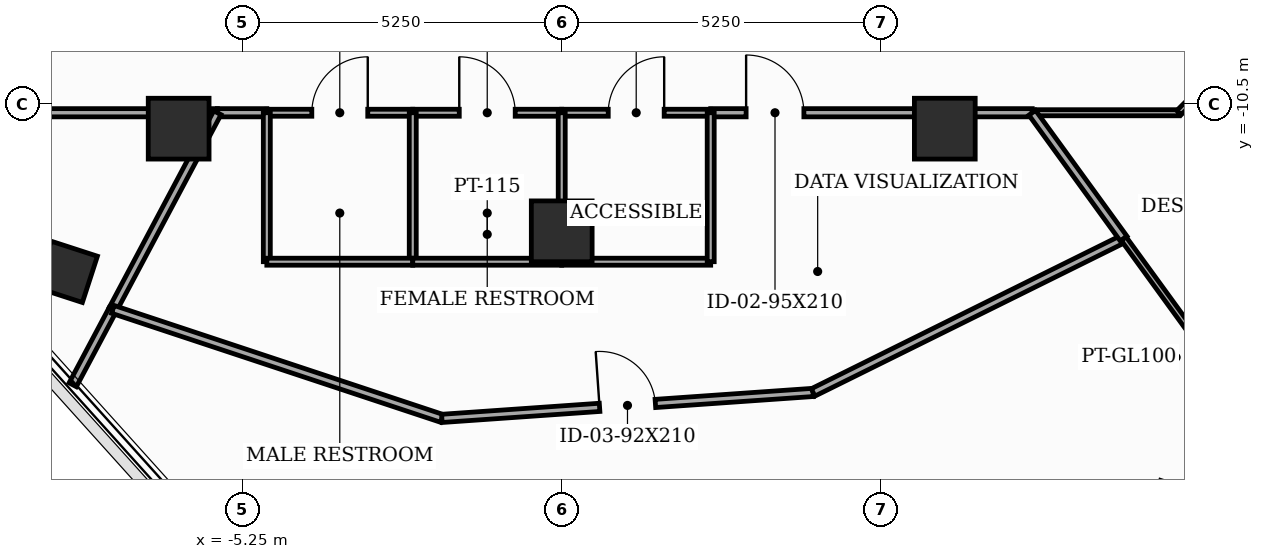
"""IFC4 building model, lengths in metres.
Left out: names, types, materials, properties, quantities, classifications, styles, units other than length and angle.
Written with IfcOpenShell. Run it as: python <this file> out.ifc"""

import sys

from ifc_helpers import new_model, si_unit, direction, frame, frame_2d, origin, origin_2d, place, context, subcontext, project, spatial, rectangle, extrude, element, fill, save


model = new_model("IFC4")
c1 = context("Model", 3, precision=1e-05, world=origin(), true_north=direction((0.0, 1.0)))
c2 = subcontext(c1, "Body", "Model", "MODEL_VIEW")
j1 = project(units=[si_unit("LENGTHUNIT", "METRE"), si_unit("PLANEANGLEUNIT", "RADIAN")], contexts=[c1])
p1 = place(None, origin())
s1 = spatial("IfcSite", under=j1, at=p1, CompositionType="ELEMENT")
p2 = place(p1, origin())
s2 = spatial("IfcBuilding", under=s1, at=p2, CompositionType="ELEMENT")
p3 = place(p2, frame((0.0, 0.0, 294.3)))
s3 = spatial("IfcBuildingStorey", under=s2, at=p3, CompositionType="ELEMENT", Elevation=294.3)
for number, where, z_axis, x_axis in (
    (1, (-6.3, -10.912, 0.0), (0.0, 0.0, 1.0), (1.0, 0.0, 0.0)),
    (2, (0.0, -12.6, 0.0), (0.0, 0.0, 1.0), (1.0, 0.0, 0.0)),
    (3, (6.3, -10.912, 0.0), (0.0, 0.0, 1.0), (1.0, 0.0, 0.0)),
):
    element("IfcColumn", number, at=place(p3, frame(where, z_axis=z_axis, x_axis=x_axis)), inside=s3, PredefinedType="COLUMN", context=c2, shape_type="SweptSolid", body=[
        extrude(rectangle(XDim=1.0, YDim=1.0, at=origin_2d()), origin(), (0.0, 0.0, 1.0), 3.7),
    ])
p4 = place(p3, frame((-8.14, -13.266, 0.0), z_axis=(0.0, 0.0, 1.0), x_axis=(0.309016994375, 0.951056516295, 0.0)))
e4 = element("IfcColumn", 4, at=p4, inside=s3, PredefinedType="COLUMN", context=c2, shape_type="SweptSolid", body=[
    extrude(rectangle(XDim=0.8, YDim=0.8, at=origin_2d()), origin(), (0.0, 0.0, 1.0), 3.7),
])
p5 = place(p3, frame((-10.15, -10.65, 0.0), z_axis=(0.0, 0.0, 1.0), x_axis=(1.0, 0.0, 0.0)))
e5 = element("IfcWall", 5, at=p5, inside=s3, PredefinedType="PARTITIONING", context=c2, shape_type="SweptSolid", body=[
    extrude(rectangle(XDim=4.487, YDim=0.135, at=frame_2d((2.243, 0.0))), origin(), (0.0, 0.0, 1.0), 2.885),
])
p6 = place(p3, frame((-4.85, -10.65, 0.0), z_axis=(0.0, 0.0, 1.0), x_axis=(1.0, 0.0, 0.0)))
e6 = element("IfcWall", 6, at=p6, inside=s3, PredefinedType="PARTITIONING", context=c2, shape_type="SweptSolid", body=[
    extrude(rectangle(XDim=2.4, YDim=0.115, at=frame_2d((1.2, 0.0))), origin(), (0.0, 0.0, 1.0), 3.5),
])
p7 = place(p6, frame((0.74, 0.0, 0.0)))
e7 = element("IfcOpeningElement", 7, at=p7, cuts=e6, PredefinedType="OPENING", context=c2, shape_type="SweptSolid", body=[
    extrude(rectangle(XDim=0.92, YDim=2.1, at=frame_2d((0.46, 1.05))), frame((0.0, 0.067, 0.0), z_axis=(0.0, -1.0, 0.0), x_axis=(1.0, 0.0, 0.0)), (0.0, 0.0, 1.0), 0.135),
])
p8 = place(p3, frame((-2.45, -10.65, 0.0), z_axis=(0.0, 0.0, 1.0), x_axis=(1.0, 0.0, 0.0)))
e8 = element("IfcWall", 8, at=p8, inside=s3, PredefinedType="PARTITIONING", context=c2, shape_type="SweptSolid", body=[
    extrude(rectangle(XDim=2.45, YDim=0.115, at=frame_2d((1.225, 0.0))), origin(), (0.0, 0.0, 1.0), 2.885),
])
p9 = place(p8, frame((0.765, 0.0, 0.0)))
e9 = element("IfcOpeningElement", 9, at=p9, cuts=e8, PredefinedType="OPENING", context=c2, shape_type="SweptSolid", body=[
    extrude(rectangle(XDim=0.92, YDim=2.1, at=frame_2d((0.46, 1.05))), frame((0.0, 0.067, 0.0), z_axis=(0.0, -1.0, 0.0), x_axis=(1.0, 0.0, 0.0)), (0.0, 0.0, 1.0), 0.135),
])
p10 = place(p3, frame((0.0, -10.65, 0.0), z_axis=(0.0, 0.0, 1.0), x_axis=(1.0, 0.0, 0.0)))
e10 = element("IfcWall", 10, at=p10, inside=s3, PredefinedType="PARTITIONING", context=c2, shape_type="SweptSolid", body=[
    extrude(rectangle(XDim=2.45, YDim=0.115, at=frame_2d((1.225, 0.0))), origin(), (0.0, 0.0, 1.0), 3.5),
])
p11 = place(p10, frame((0.765, 0.0, 0.0)))
e11 = element("IfcOpeningElement", 11, at=p11, cuts=e10, PredefinedType="OPENING", context=c2, shape_type="SweptSolid", body=[
    extrude(rectangle(XDim=0.92, YDim=2.1, at=frame_2d((0.46, 1.05))), frame((0.0, 0.067, 0.0), z_axis=(0.0, -1.0, 0.0), x_axis=(1.0, 0.0, 0.0)), (0.0, 0.0, 1.0), 0.135),
])
p12 = place(p3, frame((-5.663, -10.65, 0.0), z_axis=(0.0, 0.0, 1.0), x_axis=(1.0, 0.0, 0.0)))
e12 = element("IfcWall", 12, at=p12, inside=s3, PredefinedType="PARTITIONING", context=c2, shape_type="SweptSolid", body=[
    extrude(rectangle(XDim=0.813, YDim=0.135, at=frame_2d((0.406, 0.0))), origin(), (0.0, 0.0, 1.0), 3.5),
])
p13 = place(p3, frame((2.45, -10.65, 0.0), z_axis=(0.0, 0.0, 1.0), x_axis=(1.0, 0.0, 0.0)))
e13 = element("IfcWall", 13, at=p13, inside=s3, PredefinedType="PARTITIONING", context=c2, shape_type="SweptSolid", body=[
    extrude(rectangle(XDim=5.288, YDim=0.135, at=frame_2d((2.644, 0.0))), origin(), (0.0, 0.0, 1.0), 2.885),
])
p14 = place(p13, frame((0.583, 0.0, 0.0)))
e14 = element("IfcOpeningElement", 14, at=p14, cuts=e13, PredefinedType="OPENING", context=c2, shape_type="SweptSolid", body=[
    extrude(rectangle(XDim=0.95, YDim=2.1, at=frame_2d((0.475, 1.05))), frame((0.0, 0.077, 0.0), z_axis=(0.0, -1.0, 0.0), x_axis=(1.0, 0.0, 0.0)), (0.0, 0.0, 1.0), 0.155),
])
p15 = place(p3, frame((7.738, -10.65, 0.0), z_axis=(0.0, 0.0, 1.0), x_axis=(1.0, 0.0, 0.0)))
e15 = element("IfcWall", 15, at=p15, inside=s3, PredefinedType="MOVABLE", context=c2, shape_type="SweptSolid", body=[
    extrude(rectangle(XDim=2.412, YDim=0.1, at=frame_2d((1.206, 0.0))), origin(), (0.0, 0.0, 1.0), 3.5),
])
p16 = place(p3, frame((10.15, -10.65, 0.0), z_axis=(0.0, 0.0, 1.0), x_axis=(0.707106781187, 0.707106781187, 0.0)))
e16 = element("IfcWall", 16, at=p16, inside=s3, PredefinedType="MOVABLE", context=c2, shape_type="SweptSolid", body=[
    extrude(rectangle(XDim=0.707, YDim=0.1, at=frame_2d((0.354, 0.0))), origin(), (0.0, 0.0, 1.0), 3.5),
])
p17 = place(p3, frame((-7.382, -13.884, 0.0), z_axis=(0.0, 0.0, 1.0), x_axis=(0.469338791783, 0.88301817565, 0.0)))
e17 = element("IfcWall", 17, at=p17, inside=s3, PredefinedType="PARTITIONING", context=c2, shape_type="SweptSolid", body=[
    extrude(rectangle(XDim=3.663, YDim=0.135, at=frame_2d((1.831, 0.0))), origin(), (0.0, 0.0, 1.0), 2.885),
])
p18 = place(p3, frame((-8.042, -15.124, 0.0), z_axis=(0.0, 0.0, 1.0), x_axis=(0.469595679185, 0.882881587808, 0.0)))
e18 = element("IfcWall", 18, at=p18, inside=s3, PredefinedType="PARTITIONING", context=c2, shape_type="SweptSolid", body=[
    extrude(rectangle(XDim=1.405, YDim=0.135, at=frame_2d((0.702, 0.0))), origin(), (0.0, 0.0, 1.0), 3.035),
])
for number, where, z_axis, x_axis in (
    (19, (-2.45, -13.1, 0.0), (0.0, 0.0, 1.0), (0.0, 1.0, 0.0)),
    (20, (-4.85, -10.65, 0.0), (0.0, 0.0, 1.0), (0.0, -1.0, 0.0)),
):
    element("IfcWall", number, at=place(p3, frame(where, z_axis=z_axis, x_axis=x_axis)), inside=s3, PredefinedType="PARTITIONING", context=c2, shape_type="SweptSolid", body=[
        extrude(rectangle(XDim=2.45, YDim=0.115, at=frame_2d((1.225, 0.0))), origin(), (0.0, 0.0, 1.0), 2.885),
    ])
p19 = place(p3, frame((-4.85, -13.1, 0.0), z_axis=(0.0, 0.0, 1.0), x_axis=(1.0, 0.0, 0.0)))
e21 = element("IfcWall", 21, at=p19, inside=s3, PredefinedType="PARTITIONING", context=c2, shape_type="SweptSolid", body=[
    extrude(rectangle(XDim=2.4, YDim=0.115, at=frame_2d((1.2, 0.0))), origin(), (0.0, 0.0, 1.0), 3.5),
])
p20 = place(p3, frame((0.0, -13.1, 0.0), z_axis=(0.0, 0.0, 1.0), x_axis=(0.0, 1.0, 0.0)))
e22 = element("IfcWall", 22, at=p20, inside=s3, PredefinedType="PARTITIONING", context=c2, shape_type="SweptSolid", body=[
    extrude(rectangle(XDim=2.45, YDim=0.115, at=frame_2d((1.225, 0.0))), origin(), (0.0, 0.0, 1.0), 2.885),
])
for number, where, z_axis, x_axis in (
    (23, (-2.45, -13.1, 0.0), (0.0, 0.0, 1.0), (1.0, 0.0, 0.0)),
    (24, (0.0, -13.1, 0.0), (0.0, 0.0, 1.0), (1.0, 0.0, 0.0)),
):
    element("IfcWall", number, at=place(p3, frame(where, z_axis=z_axis, x_axis=x_axis)), inside=s3, PredefinedType="PARTITIONING", context=c2, shape_type="SweptSolid", body=[
        extrude(rectangle(XDim=2.45, YDim=0.115, at=frame_2d((1.225, 0.0))), origin(), (0.0, 0.0, 1.0), 3.035),
    ])
p21 = place(p3, frame((2.45, -13.1, 0.0), z_axis=(0.0, 0.0, 1.0), x_axis=(0.0, 1.0, 0.0)))
e25 = element("IfcWall", 25, at=p21, inside=s3, PredefinedType="PARTITIONING", context=c2, shape_type="SweptSolid", body=[
    extrude(rectangle(XDim=2.45, YDim=0.115, at=frame_2d((1.225, 0.0))), origin(), (0.0, 0.0, 1.0), 2.885),
])
p22 = place(p3, frame((-7.382, -13.884, 0.0), z_axis=(0.0, 0.0, 1.0), x_axis=(0.949247116003, -0.314531258795, 0.0)))
e26 = element("IfcWall", 26, at=p22, inside=s3, PredefinedType="PARTITIONING", context=c2, shape_type="SweptSolid", body=[
    extrude(rectangle(XDim=5.7, YDim=0.135, at=frame_2d((2.85, 0.0))), origin(), (0.0, 0.0, 1.0), 3.035),
])
p23 = place(p3, frame((-1.971, -15.677, 0.0), z_axis=(0.0, 0.0, 1.0), x_axis=(0.997562911572, 0.069772755832, 0.0)))
e27 = element("IfcWall", 27, at=p23, inside=s3, PredefinedType="PARTITIONING", context=c2, shape_type="SweptSolid", body=[
    extrude(rectangle(XDim=6.12, YDim=0.135, at=frame_2d((3.06, 0.0))), origin(), (0.0, 0.0, 1.0), 3.035),
])
p24 = place(p23, frame((2.6, 0.0, 0.0)))
e28 = element("IfcOpeningElement", 28, at=p24, cuts=e27, PredefinedType="OPENING", context=c2, shape_type="SweptSolid", body=[
    extrude(rectangle(XDim=0.92, YDim=2.1, at=frame_2d((0.46, 1.05))), frame((0.0, 0.077, 0.0), z_axis=(0.0, -1.0, 0.0), x_axis=(1.0, 0.0, 0.0)), (0.0, 0.0, 1.0), 0.155),
])
p25 = place(p3, frame((4.134, -15.25, 0.0), z_axis=(0.0, 0.0, 1.0), x_axis=(0.896167979159, 0.443714945804, 0.0)))
e29 = element("IfcWall", 29, at=p25, inside=s3, PredefinedType="PARTITIONING", context=c2, shape_type="SweptSolid", body=[
    extrude(rectangle(XDim=5.7, YDim=0.135, at=frame_2d((2.85, 0.0))), origin(), (0.0, 0.0, 1.0), 3.035),
])
p26 = place(p3, frame((9.242, -12.721, 0.0), z_axis=(0.0, 0.0, 1.0), x_axis=(-0.58758169089, 0.80916485127, 0.0)))
e30 = element("IfcWall", 30, at=p26, inside=s3, PredefinedType="PARTITIONING", context=c2, shape_type="SweptSolid", body=[
    extrude(rectangle(XDim=2.56, YDim=0.135, at=frame_2d((1.28, 0.0))), origin(), (0.0, 0.0, 1.0), 3.5),
])
p27 = place(p3, frame((11.695, -16.096, 0.0), z_axis=(0.0, 0.0, 1.0), x_axis=(-0.587938546927, 0.808905597111, 0.0)))
e31 = element("IfcWall", 31, at=p27, inside=s3, PredefinedType="MOVABLE", context=c2, shape_type="SweptSolid", body=[
    extrude(rectangle(XDim=4.172, YDim=0.1, at=frame_2d((2.086, 0.0))), origin(), (0.0, 0.0, 1.0), 3.035),
])
p28 = place(p7, origin())
e32 = element("IfcDoor", 32, at=p28, inside=s3, OperationType="SINGLE_SWING_RIGHT", PredefinedType="DOOR", context=c2, shape_type="SweptSolid", body=[
    extrude(rectangle(XDim=0.92, YDim=2.1, at=frame_2d((0.46, 1.05))), frame((0.0, 0.025, 0.0), z_axis=(0.0, -1.0, 0.0), x_axis=(1.0, 0.0, 0.0)), (0.0, 0.0, 1.0), 0.05),
])
fill(e7, e32)
p29 = place(p9, origin())
e33 = element("IfcDoor", 33, at=p29, inside=s3, OperationType="SINGLE_SWING_LEFT", PredefinedType="DOOR", context=c2, shape_type="SweptSolid", body=[
    extrude(rectangle(XDim=0.92, YDim=2.1, at=frame_2d((0.46, 1.05))), frame((0.0, 0.025, 0.0), z_axis=(0.0, -1.0, 0.0), x_axis=(1.0, 0.0, 0.0)), (0.0, 0.0, 1.0), 0.05),
])
fill(e9, e33)
p30 = place(p11, origin())
e34 = element("IfcDoor", 34, at=p30, inside=s3, OperationType="SINGLE_SWING_RIGHT", PredefinedType="DOOR", context=c2, shape_type="SweptSolid", body=[
    extrude(rectangle(XDim=0.92, YDim=2.1, at=frame_2d((0.46, 1.05))), frame((0.0, 0.025, 0.0), z_axis=(0.0, -1.0, 0.0), x_axis=(1.0, 0.0, 0.0)), (0.0, 0.0, 1.0), 0.05),
])
fill(e11, e34)
p31 = place(p14, origin())
e35 = element("IfcDoor", 35, at=p31, inside=s3, OperationType="SINGLE_SWING_LEFT", PredefinedType="DOOR", context=c2, shape_type="SweptSolid", body=[
    extrude(rectangle(XDim=0.95, YDim=2.1, at=frame_2d((0.475, 1.05))), frame((0.0, 0.025, 0.0), z_axis=(0.0, -1.0, 0.0), x_axis=(1.0, 0.0, 0.0)), (0.0, 0.0, 1.0), 0.05),
])
fill(e14, e35)
p32 = place(p24, origin())
e36 = element("IfcDoor", 36, at=p32, inside=s3, OperationType="SINGLE_SWING_LEFT", PredefinedType="DOOR", context=c2, shape_type="SweptSolid", body=[
    extrude(rectangle(XDim=0.92, YDim=2.1, at=frame_2d((0.46, 1.05))), frame((0.0, 0.025, 0.0), z_axis=(0.0, -1.0, 0.0), x_axis=(1.0, 0.0, 0.0)), (0.0, 0.0, 1.0), 0.05),
])
fill(e28, e36)
save(model, sys.argv[1])
